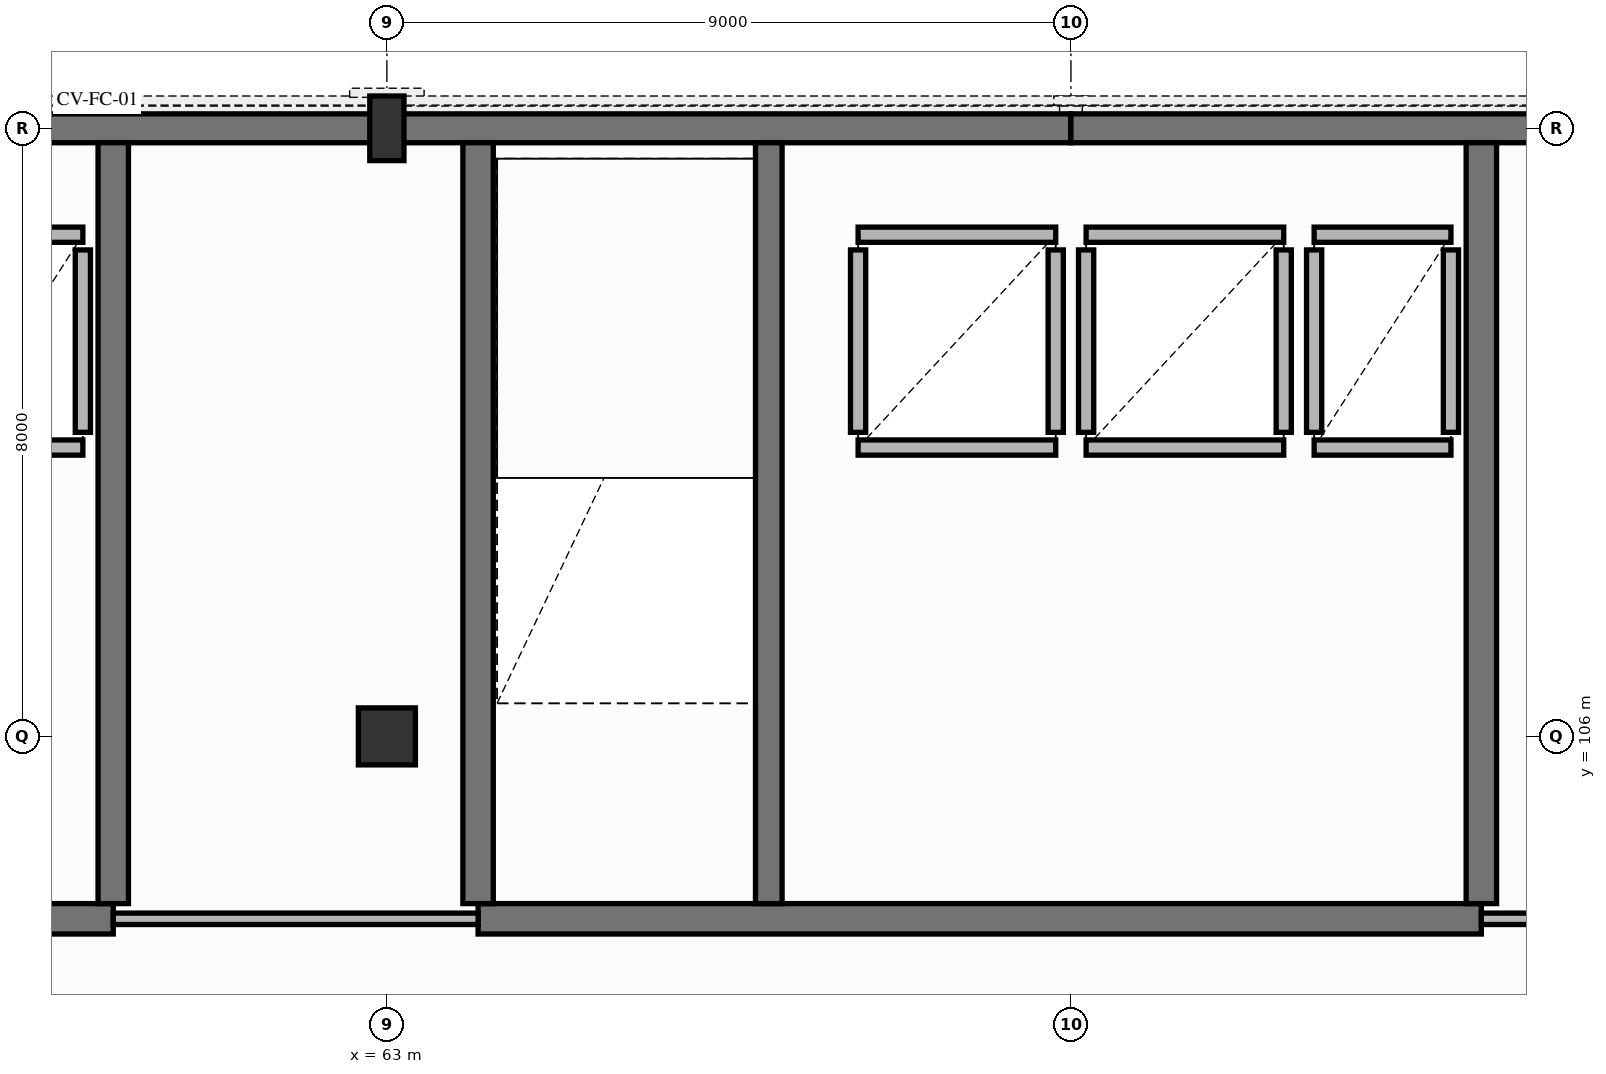
"""IFC4 building model, lengths in metres.
Left out: names, types, materials, properties, quantities, classifications, styles, units other than length and angle.
Written with IfcOpenShell. Run it as: python <this file> out.ifc"""

import sys

from ifc_helpers import new_model, si_unit, direction, frame, frame_2d, origin, origin_2d, place, context, subcontext, project, spatial, rectangle, extrude, element, fill, save


model = new_model("IFC4")
c1 = context("Model", 3, precision=1e-05, world=origin(), true_north=direction((0.0, 1.0)))
c2 = subcontext(c1, "Body", "Model", "MODEL_VIEW")
j1 = project(units=[si_unit("LENGTHUNIT", "METRE"), si_unit("PLANEANGLEUNIT", "RADIAN")], contexts=[c1])
p1 = place(None, origin())
s1 = spatial("IfcSite", under=j1, at=p1, CompositionType="ELEMENT")
p2 = place(p1, origin())
s2 = spatial("IfcBuilding", under=s1, at=p2, CompositionType="ELEMENT")
p3 = place(p2, frame((0.0, 0.0, 8.94)))
s3 = spatial("IfcBuildingStorey", under=s2, at=p3, CompositionType="ELEMENT", Elevation=8.94)
p4 = place(p3, frame((63.0, 106.0, 0.0), z_axis=(0.0, 0.0, 1.0), x_axis=(1.0, 0.0, 0.0)))
e1 = element("IfcColumn", 1, at=p4, inside=s3, PredefinedType="COLUMN", context=c2, shape_type="SweptSolid", body=[
    extrude(rectangle(XDim=0.75, YDim=0.75, at=origin_2d()), origin(), (0.0, 0.0, 1.0), 3.84),
])
p5 = place(p3, frame((63.0, 114.0, 0.0), z_axis=(0.0, 0.0, 1.0), x_axis=(0.0, 1.0, 0.0)))
e2 = element("IfcColumn", 2, at=p5, inside=s3, PredefinedType="COLUMN", context=c2, shape_type="SweptSolid", body=[
    extrude(rectangle(XDim=0.45, YDim=0.85, at=origin_2d()), origin(), (0.0, 0.0, 1.0), 3.84),
])
for number, where, z_axis, x_axis in (
    (3, (54.0, 114.0, 0.0), (0.0, 0.0, 1.0), (1.0, 0.0, 0.0)),
    (4, (63.0, 114.0, 0.0), (0.0, 0.0, 1.0), (1.0, 0.0, 0.0)),
    (5, (72.0, 114.0, 0.0), (0.0, 0.0, 1.0), (1.0, 0.0, 0.0)),
):
    element("IfcWall", number, at=place(p3, frame(where, z_axis=z_axis, x_axis=x_axis)), inside=s3, PredefinedType="SOLIDWALL", context=c2, shape_type="SweptSolid", body=[
        extrude(rectangle(XDim=9.0, YDim=0.38, at=frame_2d((4.5, 0.0))), origin(), (0.0, 0.0, 1.0), 3.53),
    ])
p6 = place(p3, frame((46.2, 103.6, 0.0), z_axis=(0.0, 0.0, 1.0), x_axis=(1.0, 0.0, 0.0)))
e6 = element("IfcWall", 6, at=p6, inside=s3, PredefinedType="SHEAR", context=c2, shape_type="SweptSolid", body=[
    extrude(rectangle(XDim=13.2, YDim=0.4, at=frame_2d((6.6, 0.0))), origin(), (0.0, 0.0, 1.0), 3.53),
])
p7 = place(p6, frame((5.8, 0.0, 0.0)))
e7 = element("IfcOpeningElement", 7, at=p7, cuts=e6, PredefinedType="OPENING", context=c2, shape_type="SweptSolid", body=[
    extrude(rectangle(XDim=1.5, YDim=2.2, at=frame_2d((0.75, 1.1))), frame((0.0, 0.21, 0.0), z_axis=(0.0, -1.0, 0.0), x_axis=(1.0, 0.0, 0.0)), (0.0, 0.0, 1.0), 0.42),
])
p8 = place(p3, frame((59.4, 103.8, 0.0), z_axis=(0.0, 0.0, 1.0), x_axis=(0.0, 1.0, 0.0)))
e8 = element("IfcWall", 8, at=p8, inside=s3, PredefinedType="SHEAR", context=c2, shape_type="SweptSolid", body=[
    extrude(rectangle(XDim=10.01, YDim=0.4, at=frame_2d((5.005, 0.0))), origin(), (0.0, 0.0, 1.0), 3.53),
])
p9 = place(p3, frame((57.2, 109.8, 0.0), z_axis=(0.0, 0.0, 1.0), x_axis=(1.0, 0.0, 0.0)))
e9 = element("IfcWall", 9, at=p9, inside=s3, PredefinedType="PARTITIONING", context=c2, shape_type="SweptSolid", body=[
    extrude(rectangle(XDim=1.8, YDim=0.2, at=frame_2d((0.9, 0.0))), origin(), (0.0, 0.0, 1.0), 3.53),
])
p10 = place(p9, frame((0.45, 0.0, 0.0)))
e10 = element("IfcOpeningElement", 10, at=p10, cuts=e9, PredefinedType="OPENING", context=c2, shape_type="SweptSolid", body=[
    extrude(rectangle(XDim=0.9, YDim=2.1, at=frame_2d((0.45, 1.05))), frame((0.0, 0.11, 0.0), z_axis=(0.0, -1.0, 0.0), x_axis=(1.0, 0.0, 0.0)), (0.0, 0.0, 1.0), 0.22),
])
p11 = place(p3, frame((57.2, 112.6, 0.0), z_axis=(0.0, 0.0, 1.0), x_axis=(1.0, 0.0, 0.0)))
e11 = element("IfcWall", 11, at=p11, inside=s3, PredefinedType="PARTITIONING", context=c2, shape_type="SweptSolid", body=[
    extrude(rectangle(XDim=1.8, YDim=0.2, at=frame_2d((0.9, 0.0))), origin(), (0.0, 0.0, 1.0), 3.53),
])
p12 = place(p3, frame((59.0, 110.0, 0.0), z_axis=(0.0, 0.0, 1.0), x_axis=(0.0, 1.0, 0.0)))
e12 = element("IfcWall", 12, at=p12, inside=s3, PredefinedType="PARTITIONING", context=c2, shape_type="SweptSolid", body=[
    extrude(rectangle(XDim=2.4, YDim=0.2, at=frame_2d((1.2, 0.0))), origin(), (0.0, 0.0, 1.0), 3.53),
])
p13 = place(p3, frame((64.2, 103.6, 0.0), z_axis=(0.0, 0.0, 1.0), x_axis=(1.0, 0.0, 0.0)))
e13 = element("IfcWall", 13, at=p13, inside=s3, PredefinedType="SHEAR", context=c2, shape_type="SweptSolid", body=[
    extrude(rectangle(XDim=13.2, YDim=0.4, at=frame_2d((6.6, 0.0))), origin(), (0.0, 0.0, 1.0), 3.53),
])
p14 = place(p13, frame((5.8, 0.0, 0.0)))
e14 = element("IfcOpeningElement", 14, at=p14, cuts=e13, PredefinedType="OPENING", context=c2, shape_type="SweptSolid", body=[
    extrude(rectangle(XDim=1.5, YDim=2.2, at=frame_2d((0.75, 1.1))), frame((0.0, 0.21, 0.0), z_axis=(0.0, -1.0, 0.0), x_axis=(1.0, 0.0, 0.0)), (0.0, 0.0, 1.0), 0.42),
])
for number, where, z_axis, x_axis in (
    (15, (64.2, 103.8, 0.0), (0.0, 0.0, 1.0), (0.0, 1.0, 0.0)),
    (16, (77.4, 103.8, 0.0), (0.0, 0.0, 1.0), (0.0, 1.0, 0.0)),
):
    element("IfcWall", number, at=place(p3, frame(where, z_axis=z_axis, x_axis=x_axis)), inside=s3, PredefinedType="SHEAR", context=c2, shape_type="SweptSolid", body=[
        extrude(rectangle(XDim=10.01, YDim=0.4, at=frame_2d((5.005, 0.0))), origin(), (0.0, 0.0, 1.0), 3.53),
    ])
p15 = place(p3, frame((68.025, 103.8, 0.0), z_axis=(0.0, 0.0, 1.0), x_axis=(0.0, 1.0, 0.0)))
e17 = element("IfcWall", 17, at=p15, inside=s3, PredefinedType="SHEAR", context=c2, shape_type="SweptSolid", body=[
    extrude(rectangle(XDim=10.01, YDim=0.35, at=frame_2d((5.005, 0.0))), origin(), (0.0, 0.0, 1.0), 3.53),
])
p16 = place(p15, frame((0.45, 0.0, 0.0)))
e18 = element("IfcOpeningElement", 18, at=p16, cuts=e17, PredefinedType="OPENING", context=c2, shape_type="SweptSolid", body=[
    extrude(rectangle(XDim=1.05, YDim=2.2, at=frame_2d((0.525, 1.1))), frame((0.0, 0.185, 0.0), z_axis=(0.0, -1.0, 0.0), x_axis=(1.0, 0.0, 0.0)), (0.0, 0.0, 1.0), 0.37),
])
p17 = place(p3, frame((69.2, 109.8, 0.0), z_axis=(0.0, 0.0, 1.0), x_axis=(1.0, 0.0, 0.0)))
e19 = element("IfcWall", 19, at=p17, inside=s3, PredefinedType="PARTITIONING", context=c2, shape_type="SweptSolid", body=[
    extrude(rectangle(XDim=2.6, YDim=0.2, at=frame_2d((1.3, 0.0))), origin(), (0.0, 0.0, 1.0), 3.53),
])
p18 = place(p17, frame((0.75, 0.0, 0.0)))
e20 = element("IfcOpeningElement", 20, at=p18, cuts=e19, PredefinedType="OPENING", context=c2, shape_type="SweptSolid", body=[
    extrude(rectangle(XDim=1.1, YDim=2.15, at=frame_2d((0.55, 1.075))), frame((0.0, 0.11, 0.0), z_axis=(0.0, -1.0, 0.0), x_axis=(1.0, 0.0, 0.0)), (0.0, 0.0, 1.0), 0.22),
])
p19 = place(p3, frame((69.2, 112.6, 0.0), z_axis=(0.0, 0.0, 1.0), x_axis=(1.0, 0.0, 0.0)))
e21 = element("IfcWall", 21, at=p19, inside=s3, PredefinedType="PARTITIONING", context=c2, shape_type="SweptSolid", body=[
    extrude(rectangle(XDim=2.6, YDim=0.2, at=frame_2d((1.3, 0.0))), origin(), (0.0, 0.0, 1.0), 3.53),
])
for number, where, z_axis, x_axis in (
    (22, (69.2, 110.0, 0.0), (0.0, 0.0, 1.0), (0.0, 1.0, 0.0)),
    (23, (71.8, 110.0, 0.0), (0.0, 0.0, 1.0), (0.0, 1.0, 0.0)),
):
    element("IfcWall", number, at=place(p3, frame(where, z_axis=z_axis, x_axis=x_axis)), inside=s3, PredefinedType="PARTITIONING", context=c2, shape_type="SweptSolid", body=[
        extrude(rectangle(XDim=2.4, YDim=0.2, at=frame_2d((1.2, 0.0))), origin(), (0.0, 0.0, 1.0), 3.53),
    ])
p20 = place(p3, frame((72.2, 109.8, 0.0), z_axis=(0.0, 0.0, 1.0), x_axis=(1.0, 0.0, 0.0)))
e24 = element("IfcWall", 24, at=p20, inside=s3, PredefinedType="PARTITIONING", context=c2, shape_type="SweptSolid", body=[
    extrude(rectangle(XDim=2.6, YDim=0.2, at=frame_2d((1.3, 0.0))), origin(), (0.0, 0.0, 1.0), 3.53),
])
p21 = place(p20, frame((0.75, 0.0, 0.0)))
e25 = element("IfcOpeningElement", 25, at=p21, cuts=e24, PredefinedType="OPENING", context=c2, shape_type="SweptSolid", body=[
    extrude(rectangle(XDim=1.1, YDim=2.15, at=frame_2d((0.55, 1.075))), frame((0.0, 0.11, 0.0), z_axis=(0.0, -1.0, 0.0), x_axis=(1.0, 0.0, 0.0)), (0.0, 0.0, 1.0), 0.22),
])
p22 = place(p3, frame((72.2, 112.6, 0.0), z_axis=(0.0, 0.0, 1.0), x_axis=(1.0, 0.0, 0.0)))
e26 = element("IfcWall", 26, at=p22, inside=s3, PredefinedType="PARTITIONING", context=c2, shape_type="SweptSolid", body=[
    extrude(rectangle(XDim=2.6, YDim=0.2, at=frame_2d((1.3, 0.0))), origin(), (0.0, 0.0, 1.0), 3.53),
])
for number, where, z_axis, x_axis in (
    (27, (72.2, 110.0, 0.0), (0.0, 0.0, 1.0), (0.0, 1.0, 0.0)),
    (28, (74.8, 110.0, 0.0), (0.0, 0.0, 1.0), (0.0, 1.0, 0.0)),
):
    element("IfcWall", number, at=place(p3, frame(where, z_axis=z_axis, x_axis=x_axis)), inside=s3, PredefinedType="PARTITIONING", context=c2, shape_type="SweptSolid", body=[
        extrude(rectangle(XDim=2.4, YDim=0.2, at=frame_2d((1.2, 0.0))), origin(), (0.0, 0.0, 1.0), 3.53),
    ])
p23 = place(p3, frame((75.2, 109.8, 0.0), z_axis=(0.0, 0.0, 1.0), x_axis=(1.0, 0.0, 0.0)))
e29 = element("IfcWall", 29, at=p23, inside=s3, PredefinedType="PARTITIONING", context=c2, shape_type="SweptSolid", body=[
    extrude(rectangle(XDim=1.8, YDim=0.2, at=frame_2d((0.9, 0.0))), origin(), (0.0, 0.0, 1.0), 3.53),
])
p24 = place(p23, frame((0.45, 0.0, 0.0)))
e30 = element("IfcOpeningElement", 30, at=p24, cuts=e29, PredefinedType="OPENING", context=c2, shape_type="SweptSolid", body=[
    extrude(rectangle(XDim=0.9, YDim=2.1, at=frame_2d((0.45, 1.05))), frame((0.0, 0.11, 0.0), z_axis=(0.0, -1.0, 0.0), x_axis=(1.0, 0.0, 0.0)), (0.0, 0.0, 1.0), 0.22),
])
p25 = place(p3, frame((75.2, 112.6, 0.0), z_axis=(0.0, 0.0, 1.0), x_axis=(1.0, 0.0, 0.0)))
e31 = element("IfcWall", 31, at=p25, inside=s3, PredefinedType="PARTITIONING", context=c2, shape_type="SweptSolid", body=[
    extrude(rectangle(XDim=1.8, YDim=0.2, at=frame_2d((0.9, 0.0))), origin(), (0.0, 0.0, 1.0), 3.53),
])
for number, where, z_axis, x_axis in (
    (32, (75.2, 110.0, 0.0), (0.0, 0.0, 1.0), (0.0, 1.0, 0.0)),
    (33, (77.0, 110.0, 0.0), (0.0, 0.0, 1.0), (0.0, 1.0, 0.0)),
):
    element("IfcWall", number, at=place(p3, frame(where, z_axis=z_axis, x_axis=x_axis)), inside=s3, PredefinedType="PARTITIONING", context=c2, shape_type="SweptSolid", body=[
        extrude(rectangle(XDim=2.4, YDim=0.2, at=frame_2d((1.2, 0.0))), origin(), (0.0, 0.0, 1.0), 3.53),
    ])
p26 = place(p3, frame((59.4, 103.6, 0.0), z_axis=(0.0, 0.0, 1.0), x_axis=(1.0, 0.0, 0.0)))
e34 = element("IfcWall", 34, at=p26, inside=s3, PredefinedType="PARTITIONING", context=c2, shape_type="SweptSolid", body=[
    extrude(rectangle(XDim=4.8, YDim=0.15, at=frame_2d((2.4, 0.0))), origin(), (0.0, 0.0, 1.0), 3.53),
])
p27 = place(p26, frame((1.6, 0.0, 0.0)))
e35 = element("IfcOpeningElement", 35, at=p27, cuts=e34, PredefinedType="OPENING", context=c2, shape_type="SweptSolid", body=[
    extrude(rectangle(XDim=1.0, YDim=2.15, at=frame_2d((0.5, 1.075))), frame((0.0, 0.085, 0.0), z_axis=(0.0, -1.0, 0.0), x_axis=(1.0, 0.0, 0.0)), (0.0, 0.0, 1.0), 0.17),
])
p28 = place(p3, frame((77.4, 103.6, 0.0), z_axis=(0.0, 0.0, 1.0), x_axis=(1.0, 0.0, 0.0)))
e36 = element("IfcWall", 36, at=p28, inside=s3, PredefinedType="PARTITIONING", context=c2, shape_type="SweptSolid", body=[
    extrude(rectangle(XDim=21.6, YDim=0.15, at=frame_2d((10.8, 0.0))), origin(), (0.0, 0.0, 1.0), 3.53),
])
p29 = place(p28, frame((10.1, 0.0, 0.0)))
e37 = element("IfcOpeningElement", 37, at=p29, cuts=e36, PredefinedType="OPENING", context=c2, shape_type="SweptSolid", body=[
    extrude(rectangle(XDim=1.0, YDim=2.15, at=frame_2d((0.5, 1.075))), frame((0.0, 0.085, 0.0), z_axis=(0.0, -1.0, 0.0), x_axis=(1.0, 0.0, 0.0)), (0.0, 0.0, 1.0), 0.17),
])
p30 = place(p14, origin())
e38 = element("IfcDoor", 38, at=p30, inside=s3, OperationType="DOUBLE_DOOR_SINGLE_SWING", PredefinedType="DOOR", context=c2, shape_type="SweptSolid", body=[
    extrude(rectangle(XDim=1.5, YDim=2.2, at=frame_2d((0.75, 1.1))), frame((0.0, 0.025, 0.0), z_axis=(0.0, -1.0, 0.0), x_axis=(1.0, 0.0, 0.0)), (0.0, 0.0, 1.0), 0.05),
])
fill(e14, e38)
p31 = place(p16, origin())
e39 = element("IfcDoor", 39, at=p31, inside=s3, OperationType="SINGLE_SWING_LEFT", PredefinedType="DOOR", context=c2, shape_type="SweptSolid", body=[
    extrude(rectangle(XDim=1.05, YDim=2.2, at=frame_2d((0.525, 1.1))), frame((0.0, 0.025, 0.0), z_axis=(0.0, -1.0, 0.0), x_axis=(1.0, 0.0, 0.0)), (0.0, 0.0, 1.0), 0.05),
])
fill(e18, e39)
p32 = place(p18, origin())
e40 = element("IfcDoor", 40, at=p32, inside=s3, OperationType="SLIDING_TO_LEFT", PredefinedType="DOOR", context=c2, shape_type="SweptSolid", body=[
    extrude(rectangle(XDim=1.1, YDim=2.15, at=frame_2d((0.55, 1.075))), frame((0.0, 0.025, 0.0), z_axis=(0.0, -1.0, 0.0), x_axis=(1.0, 0.0, 0.0)), (0.0, 0.0, 1.0), 0.05),
])
fill(e20, e40)
p33 = place(p21, origin())
e41 = element("IfcDoor", 41, at=p33, inside=s3, OperationType="SLIDING_TO_RIGHT", PredefinedType="DOOR", context=c2, shape_type="SweptSolid", body=[
    extrude(rectangle(XDim=1.1, YDim=2.15, at=frame_2d((0.55, 1.075))), frame((0.0, 0.025, 0.0), z_axis=(0.0, -1.0, 0.0), x_axis=(1.0, 0.0, 0.0)), (0.0, 0.0, 1.0), 0.05),
])
fill(e25, e41)
p34 = place(p24, origin())
e42 = element("IfcDoor", 42, at=p34, inside=s3, OperationType="SINGLE_SWING_RIGHT", PredefinedType="DOOR", context=c2, shape_type="SweptSolid", body=[
    extrude(rectangle(XDim=0.9, YDim=2.1, at=frame_2d((0.45, 1.05))), frame((0.0, 0.025, 0.0), z_axis=(0.0, -1.0, 0.0), x_axis=(1.0, 0.0, 0.0)), (0.0, 0.0, 1.0), 0.05),
])
fill(e30, e42)
p35 = place(p27, origin())
e43 = element("IfcDoor", 43, at=p35, inside=s3, OperationType="SINGLE_SWING_RIGHT", PredefinedType="DOOR", context=c2, shape_type="SweptSolid", body=[
    extrude(rectangle(XDim=1.0, YDim=2.15, at=frame_2d((0.5, 1.075))), frame((0.0, 0.025, 0.0), z_axis=(0.0, -1.0, 0.0), x_axis=(1.0, 0.0, 0.0)), (0.0, 0.0, 1.0), 0.05),
])
fill(e35, e43)
save(model, sys.argv[1])
